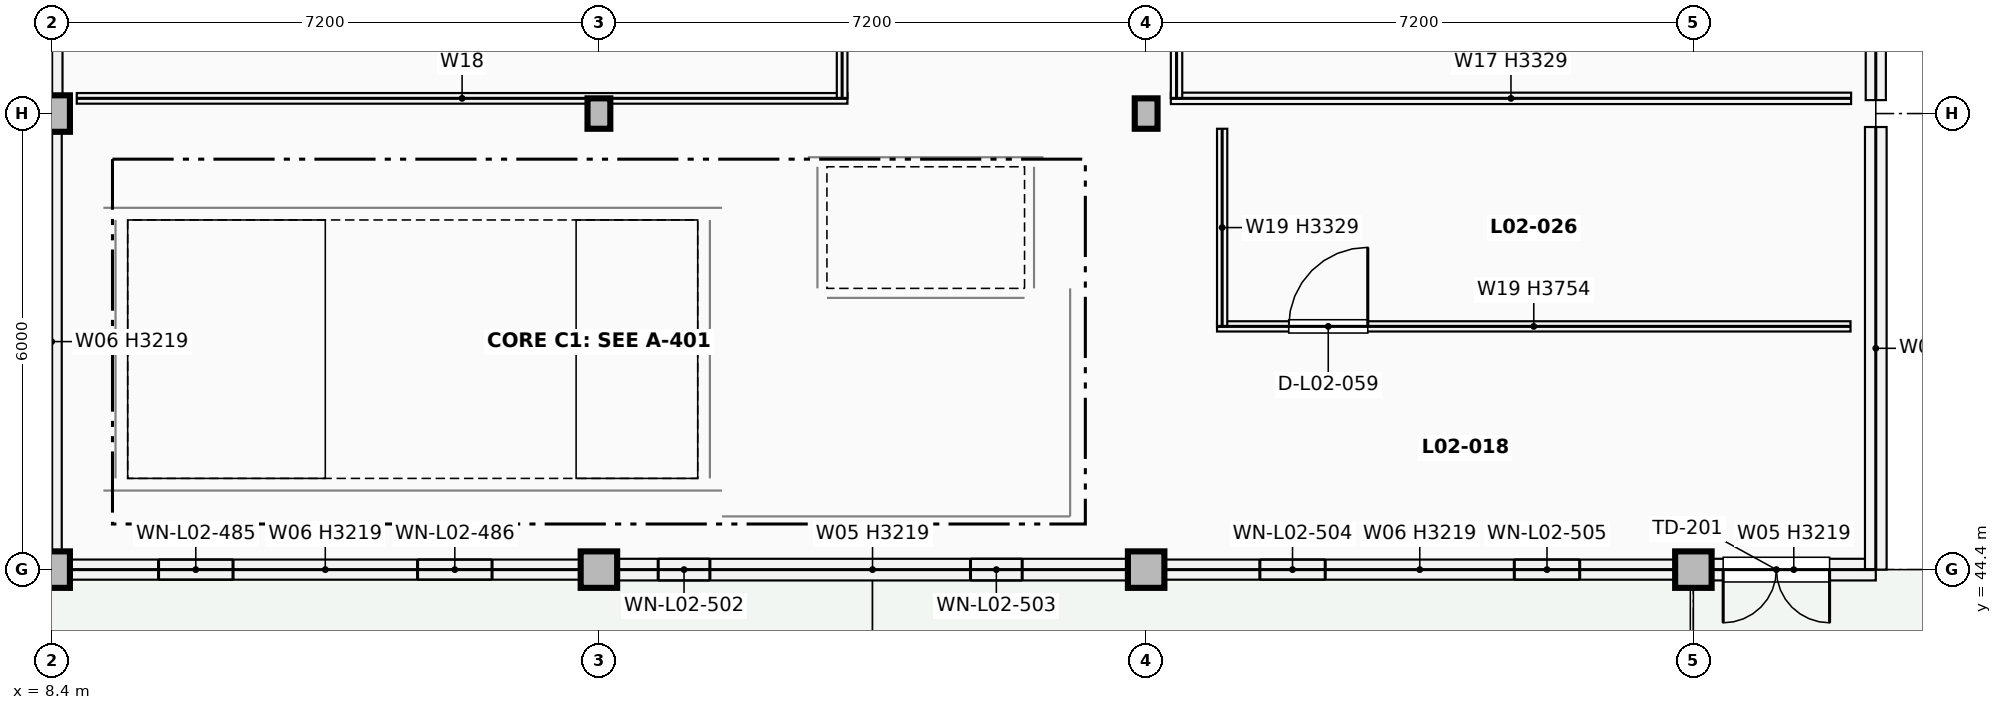
"""IFC4 building model, lengths in metres.
Left out: names, types, materials, properties, quantities, classifications, styles, units other than length and angle.
Written with IfcOpenShell. Run it as: python <this file> out.ifc"""

import sys

from ifc_helpers import new_model, si_unit, direction, frame, frame_2d, origin, origin_2d, place, context, subcontext, project, spatial, rectangle, i_section, extrude, element, fill, save


model = new_model("IFC4")
c1 = context("Model", 3, precision=1e-05, world=origin(), true_north=direction((0.0, 1.0)))
c2 = subcontext(c1, "Body", "Model", "MODEL_VIEW")
j1 = project(units=[si_unit("LENGTHUNIT", "METRE"), si_unit("PLANEANGLEUNIT", "RADIAN")], contexts=[c1])
p1 = place(None, origin())
s1 = spatial("IfcSite", under=j1, at=p1, CompositionType="ELEMENT")
p2 = place(p1, origin())
s2 = spatial("IfcBuilding", under=s1, at=p2, CompositionType="ELEMENT")
p3 = place(p2, frame((0.0, 0.0, 9.52)))
s3 = spatial("IfcBuildingStorey", under=s2, at=p3, CompositionType="ELEMENT", Elevation=9.52)
for number, where, z_axis, x_axis in (
    (1, (8.4, 44.4, 0.0), (0.0, 0.0, 1.0), (1.0, 0.0, 0.0)),
    (2, (8.4, 50.4, 0.0), (0.0, 0.0, 1.0), (1.0, 0.0, 0.0)),
    (3, (15.6, 44.4, 0.0), (0.0, 0.0, 1.0), (1.0, 0.0, 0.0)),
):
    element("IfcColumn", number, at=place(p3, frame(where, z_axis=z_axis, x_axis=x_axis)), inside=s3, PredefinedType="COLUMN", context=c2, shape_type="SweptSolid", body=[
        extrude(rectangle(XDim=0.48, YDim=0.48, at=origin_2d()), origin(), (0.0, 0.0, 1.0), 4.08),
    ])
p4 = place(p3, frame((15.6, 50.4, 0.0), z_axis=(0.0, 0.0, 1.0), x_axis=(1.0, 0.0, 0.0)))
e4 = element("IfcColumn", 4, at=p4, inside=s3, PredefinedType="COLUMN", context=c2, shape_type="SweptSolid", body=[
    extrude(i_section(OverallWidth=0.3, OverallDepth=0.4, WebThickness=0.013, FlangeThickness=0.024, at=origin_2d()), origin(), (0.0, 0.0, 1.0), 4.08),
])
p5 = place(p3, frame((22.8, 44.4, 0.0), z_axis=(0.0, 0.0, 1.0), x_axis=(1.0, 0.0, 0.0)))
e5 = element("IfcColumn", 5, at=p5, inside=s3, PredefinedType="COLUMN", context=c2, shape_type="SweptSolid", body=[
    extrude(rectangle(XDim=0.48, YDim=0.48, at=origin_2d()), origin(), (0.0, 0.0, 1.0), 4.08),
])
p6 = place(p3, frame((22.8, 50.4, 0.0), z_axis=(0.0, 0.0, 1.0), x_axis=(1.0, 0.0, 0.0)))
e6 = element("IfcColumn", 6, at=p6, inside=s3, PredefinedType="COLUMN", context=c2, shape_type="SweptSolid", body=[
    extrude(i_section(OverallWidth=0.3, OverallDepth=0.4, WebThickness=0.013, FlangeThickness=0.024, at=origin_2d()), origin(), (0.0, 0.0, 1.0), 4.08),
])
p7 = place(p3, frame((30.0, 44.4, 0.0), z_axis=(0.0, 0.0, 1.0), x_axis=(1.0, 0.0, 0.0)))
e7 = element("IfcColumn", 7, at=p7, inside=s3, PredefinedType="COLUMN", context=c2, shape_type="SweptSolid", body=[
    extrude(rectangle(XDim=0.48, YDim=0.48, at=origin_2d()), origin(), (0.0, 0.0, 1.0), 4.08),
])
p8 = place(p3, frame((8.642, 44.4, 0.0), z_axis=(0.0, 0.0, 1.0), x_axis=(1.0, 0.0, 0.0)))
e8 = element("IfcWall", 8, at=p8, inside=s3, PredefinedType="SOLIDWALL", context=c2, shape_type="SweptSolid", body=[
    extrude(rectangle(XDim=6.716, YDim=0.265, at=frame_2d((3.358, 0.0))), origin(), (0.0, 0.0, 1.0), 3.219),
])
p9 = place(p8, frame((1.164, 0.0, 0.75)))
e9 = element("IfcOpeningElement", 9, at=p9, cuts=e8, PredefinedType="OPENING", context=c2, shape_type="SweptSolid", body=[
    extrude(rectangle(XDim=0.98, YDim=1.88, at=frame_2d((0.49, 0.94))), frame((0.0, 0.143, 0.0), z_axis=(0.0, -1.0, 0.0), x_axis=(1.0, 0.0, 0.0)), (0.0, 0.0, 1.0), 0.285),
])
p10 = place(p8, frame((4.572, 0.0, 0.75)))
e10 = element("IfcOpeningElement", 10, at=p10, cuts=e8, PredefinedType="OPENING", context=c2, shape_type="SweptSolid", body=[
    extrude(rectangle(XDim=0.98, YDim=1.88, at=frame_2d((0.49, 0.94))), frame((0.0, 0.143, 0.0), z_axis=(0.0, -1.0, 0.0), x_axis=(1.0, 0.0, 0.0)), (0.0, 0.0, 1.0), 0.285),
])
p11 = place(p3, frame((15.842, 44.4, 0.0), z_axis=(0.0, 0.0, 1.0), x_axis=(1.0, 0.0, 0.0)))
e11 = element("IfcWall", 11, at=p11, inside=s3, PredefinedType="SOLIDWALL", context=c2, shape_type="SweptSolid", body=[
    extrude(rectangle(XDim=6.716, YDim=0.285, at=frame_2d((3.358, 0.0))), origin(), (0.0, 0.0, 1.0), 3.219),
])
p12 = place(p11, frame((0.538, 0.0, 0.75)))
e12 = element("IfcOpeningElement", 12, at=p12, cuts=e11, PredefinedType="OPENING", context=c2, shape_type="SweptSolid", body=[
    extrude(rectangle(XDim=0.68, YDim=2.16, at=frame_2d((0.34, 1.08))), frame((0.0, 0.152, 0.0), z_axis=(0.0, -1.0, 0.0), x_axis=(1.0, 0.0, 0.0)), (0.0, 0.0, 1.0), 0.305),
])
p13 = place(p11, frame((4.647, 0.0, 0.75)))
e13 = element("IfcOpeningElement", 13, at=p13, cuts=e11, PredefinedType="OPENING", context=c2, shape_type="SweptSolid", body=[
    extrude(rectangle(XDim=0.68, YDim=2.16, at=frame_2d((0.34, 1.08))), frame((0.0, 0.152, 0.0), z_axis=(0.0, -1.0, 0.0), x_axis=(1.0, 0.0, 0.0)), (0.0, 0.0, 1.0), 0.305),
])
p14 = place(p3, frame((23.042, 44.4, 0.0), z_axis=(0.0, 0.0, 1.0), x_axis=(1.0, 0.0, 0.0)))
e14 = element("IfcWall", 14, at=p14, inside=s3, PredefinedType="SOLIDWALL", context=c2, shape_type="SweptSolid", body=[
    extrude(rectangle(XDim=6.716, YDim=0.265, at=frame_2d((3.358, 0.0))), origin(), (0.0, 0.0, 1.0), 3.219),
])
p15 = place(p14, frame((1.254, 0.0, 0.75)))
e15 = element("IfcOpeningElement", 15, at=p15, cuts=e14, PredefinedType="OPENING", context=c2, shape_type="SweptSolid", body=[
    extrude(rectangle(XDim=0.86, YDim=2.32, at=frame_2d((0.43, 1.16))), frame((0.0, 0.143, 0.0), z_axis=(0.0, -1.0, 0.0), x_axis=(1.0, 0.0, 0.0)), (0.0, 0.0, 1.0), 0.285),
])
p16 = place(p14, frame((4.602, 0.0, 0.75)))
e16 = element("IfcOpeningElement", 16, at=p16, cuts=e14, PredefinedType="OPENING", context=c2, shape_type="SweptSolid", body=[
    extrude(rectangle(XDim=0.86, YDim=2.32, at=frame_2d((0.43, 1.16))), frame((0.0, 0.143, 0.0), z_axis=(0.0, -1.0, 0.0), x_axis=(1.0, 0.0, 0.0)), (0.0, 0.0, 1.0), 0.285),
])
p17 = place(p3, frame((30.242, 44.4, 0.0), z_axis=(0.0, 0.0, 1.0), x_axis=(1.0, 0.0, 0.0)))
e17 = element("IfcWall", 17, at=p17, inside=s3, PredefinedType="SOLIDWALL", context=c2, shape_type="SweptSolid", body=[
    extrude(rectangle(XDim=2.158, YDim=0.285, at=frame_2d((1.079, 0.0))), origin(), (0.0, 0.0, 1.0), 3.219),
])
p18 = place(p17, frame((0.15, 0.0, 0.0)))
e18 = element("IfcOpeningElement", 18, at=p18, cuts=e17, PredefinedType="OPENING", context=c2, shape_type="SweptSolid", body=[
    extrude(rectangle(XDim=1.4, YDim=2.2, at=frame_2d((0.7, 1.1))), frame((0.0, 0.152, 0.0), z_axis=(0.0, -1.0, 0.0), x_axis=(1.0, 0.0, 0.0)), (0.0, 0.0, 1.0), 0.305),
])
p19 = place(p3, frame((8.4, 44.642, 0.0), z_axis=(0.0, 0.0, 1.0), x_axis=(0.0, 1.0, 0.0)))
e19 = element("IfcWall", 19, at=p19, inside=s3, PredefinedType="SOLIDWALL", context=c2, shape_type="SweptSolid", body=[
    extrude(rectangle(XDim=5.516, YDim=0.265, at=frame_2d((2.758, 0.0))), origin(), (0.0, 0.0, 1.0), 3.219),
])
p20 = place(p3, frame((8.4, 50.642, 0.0), z_axis=(0.0, 0.0, 1.0), x_axis=(0.0, 1.0, 0.0)))
e20 = element("IfcWall", 20, at=p20, inside=s3, PredefinedType="SOLIDWALL", context=c2, shape_type="SweptSolid", body=[
    extrude(rectangle(XDim=6.781, YDim=0.285, at=frame_2d((3.391, 0.0))), origin(), (0.0, 0.0, 1.0), 3.329),
])
p21 = place(p3, frame((32.4, 44.4, 0.0), z_axis=(0.0, 0.0, 1.0), x_axis=(0.0, 1.0, 0.0)))
e21 = element("IfcWall", 21, at=p21, inside=s3, PredefinedType="SOLIDWALL", context=c2, shape_type="SweptSolid", body=[
    extrude(rectangle(XDim=5.823, YDim=0.285, at=frame_2d((2.912, 0.0))), origin(), (0.0, 0.0, 1.0), 3.329),
])
p22 = place(p3, frame((32.4, 50.577, 0.0), z_axis=(0.0, 0.0, 1.0), x_axis=(0.0, 1.0, 0.0)))
e22 = element("IfcWall", 22, at=p22, inside=s3, PredefinedType="SOLIDWALL", context=c2, shape_type="SweptSolid", body=[
    extrude(rectangle(XDim=6.846, YDim=0.265, at=frame_2d((3.423, 0.0))), origin(), (0.0, 0.0, 1.0), 3.329),
])
p23 = place(p3, frame((9.24, 45.6, 0.0), z_axis=(0.0, 0.0, 1.0), x_axis=(0.0, 1.0, 0.0)))
e23 = element("IfcWall", 23, at=p23, inside=s3, PredefinedType="SHEAR", context=c2, shape_type="SweptSolid", body=[
    extrude(rectangle(XDim=3.4, YDim=0.32, at=frame_2d((1.7, 0.0))), origin(), (0.0, 0.0, 1.0), 4.08),
])
for number, where, z_axis, x_axis in (
    (24, (9.08, 45.44, 0.0), (0.0, 0.0, 1.0), (1.0, 0.0, 0.0)),
    (25, (9.08, 49.16, 0.0), (0.0, 0.0, 1.0), (1.0, 0.0, 0.0)),
):
    element("IfcWall", number, at=place(p3, frame(where, z_axis=z_axis, x_axis=x_axis)), inside=s3, PredefinedType="SHEAR", context=c2, shape_type="SweptSolid", body=[
        extrude(rectangle(XDim=8.14, YDim=0.32, at=frame_2d((4.07, 0.0))), origin(), (0.0, 0.0, 1.0), 4.08),
    ])
p24 = place(p3, frame((17.06, 45.6, 0.0), z_axis=(0.0, 0.0, 1.0), x_axis=(0.0, 1.0, 0.0)))
e26 = element("IfcWall", 26, at=p24, inside=s3, PredefinedType="SHEAR", context=c2, shape_type="SweptSolid", body=[
    extrude(rectangle(XDim=3.4, YDim=0.32, at=frame_2d((1.7, 0.0))), origin(), (0.0, 0.0, 1.0), 4.08),
])
p25 = place(p24, frame((0.65, 0.0, 0.0)))
e27 = element("IfcOpeningElement", 27, at=p25, cuts=e26, PredefinedType="OPENING", context=c2, shape_type="SweptSolid", body=[
    extrude(rectangle(XDim=1.2, YDim=2.2, at=frame_2d((0.6, 1.1))), frame((0.0, 0.17, 0.0), z_axis=(0.0, -1.0, 0.0), x_axis=(1.0, 0.0, 0.0)), (0.0, 0.0, 1.0), 0.34),
])
for number, where, z_axis, x_axis in (
    (28, (18.475, 48.1, 0.0), (0.0, 0.0, 1.0), (0.0, 1.0, 0.0)),
    (29, (21.325, 48.1, 0.0), (0.0, 0.0, 1.0), (0.0, 1.0, 0.0)),
):
    element("IfcWall", number, at=place(p3, frame(where, z_axis=z_axis, x_axis=x_axis)), inside=s3, PredefinedType="SHEAR", context=c2, shape_type="SweptSolid", body=[
        extrude(rectangle(XDim=1.6, YDim=0.25, at=frame_2d((0.8, 0.0))), origin(), (0.0, 0.0, 1.0), 4.08),
    ])
p26 = place(p3, frame((18.35, 49.825, 0.0), z_axis=(0.0, 0.0, 1.0), x_axis=(1.0, 0.0, 0.0)))
e30 = element("IfcWall", 30, at=p26, inside=s3, PredefinedType="SHEAR", context=c2, shape_type="SweptSolid", body=[
    extrude(rectangle(XDim=3.1, YDim=0.25, at=frame_2d((1.55, 0.0))), origin(), (0.0, 0.0, 1.0), 4.08),
])
p27 = place(p3, frame((18.6, 47.975, 0.0), z_axis=(0.0, 0.0, 1.0), x_axis=(1.0, 0.0, 0.0)))
e31 = element("IfcWall", 31, at=p27, inside=s3, PredefinedType="SHEAR", context=c2, shape_type="SweptSolid", body=[
    extrude(rectangle(XDim=2.6, YDim=0.25, at=frame_2d((1.3, 0.0))), origin(), (0.0, 0.0, 1.0), 4.08),
])
p28 = place(p27, frame((0.75, 0.0, 0.0)))
e32 = element("IfcOpeningElement", 32, at=p28, cuts=e31, PredefinedType="OPENING", context=c2, shape_type="SweptSolid", body=[
    extrude(rectangle(XDim=1.1, YDim=2.15, at=frame_2d((0.55, 1.075))), frame((0.0, 0.135, 0.0), z_axis=(0.0, -1.0, 0.0), x_axis=(1.0, 0.0, 0.0)), (0.0, 0.0, 1.0), 0.27),
])
p29 = place(p3, frame((21.8, 45.1, 0.0), z_axis=(0.0, 0.0, 1.0), x_axis=(0.0, 1.0, 0.0)))
e33 = element("IfcWall", 33, at=p29, inside=s3, PredefinedType="PARTITIONING", context=c2, shape_type="SweptSolid", body=[
    extrude(rectangle(XDim=3.0, YDim=0.2, at=frame_2d((1.5, 0.0))), origin(), (0.0, 0.0, 1.0), 3.754),
])
p30 = place(p29, frame((0.775, 0.0, 0.0)))
e34 = element("IfcOpeningElement", 34, at=p30, cuts=e33, PredefinedType="OPENING", context=c2, shape_type="SweptSolid", body=[
    extrude(rectangle(XDim=1.45, YDim=2.2, at=frame_2d((0.725, 1.1))), frame((0.0, 0.11, 0.0), z_axis=(0.0, -1.0, 0.0), x_axis=(1.0, 0.0, 0.0)), (0.0, 0.0, 1.0), 0.22),
])
p31 = place(p3, frame((17.22, 45.1, 0.0), z_axis=(0.0, 0.0, 1.0), x_axis=(1.0, 0.0, 0.0)))
e35 = element("IfcWall", 35, at=p31, inside=s3, PredefinedType="PARTITIONING", context=c2, shape_type="SweptSolid", body=[
    extrude(rectangle(XDim=4.58, YDim=0.2, at=frame_2d((2.29, 0.0))), origin(), (0.0, 0.0, 1.0), 3.754),
])
p32 = place(p3, frame((8.73, 50.6, 0.0), z_axis=(0.0, 0.0, 1.0), x_axis=(1.0, 0.0, 0.0)))
e36 = element("IfcWall", 36, at=p32, inside=s3, PredefinedType="PARTITIONING", context=c2, shape_type="SweptSolid", body=[
    extrude(rectangle(XDim=10.14, YDim=0.14, at=frame_2d((5.07, 0.0))), origin(), (0.0, 0.0, 1.0), 3.299),
])
p33 = place(p3, frame((18.8, 50.6, 0.0), z_axis=(0.0, 0.0, 1.0), x_axis=(0.0, 1.0, 0.0)))
e37 = element("IfcWall", 37, at=p33, inside=s3, PredefinedType="PARTITIONING", context=c2, shape_type="SweptSolid", body=[
    extrude(rectangle(XDim=9.2, YDim=0.14, at=frame_2d((4.6, 0.0))), origin(), (0.0, 0.0, 1.0), 3.329),
])
p34 = place(p33, frame((2.165, 0.0, 0.0)))
e38 = element("IfcOpeningElement", 38, at=p34, cuts=e37, PredefinedType="OPENING", context=c2, shape_type="SweptSolid", body=[
    extrude(rectangle(XDim=0.94, YDim=2.1, at=frame_2d((0.47, 1.05))), frame((0.0, 0.08, 0.0), z_axis=(0.0, -1.0, 0.0), x_axis=(1.0, 0.0, 0.0)), (0.0, 0.0, 1.0), 0.16),
])
p35 = place(p3, frame((23.125, 50.6, 0.0), z_axis=(0.0, 0.0, 1.0), x_axis=(1.0, 0.0, 0.0)))
e39 = element("IfcWall", 39, at=p35, inside=s3, PredefinedType="PARTITIONING", context=c2, shape_type="SweptSolid", body=[
    extrude(rectangle(XDim=8.95, YDim=0.15, at=frame_2d((4.475, 0.0))), origin(), (0.0, 0.0, 1.0), 3.329),
])
p36 = place(p3, frame((23.2, 50.6, 0.0), z_axis=(0.0, 0.0, 1.0), x_axis=(0.0, 1.0, 0.0)))
e40 = element("IfcWall", 40, at=p36, inside=s3, PredefinedType="PARTITIONING", context=c2, shape_type="SweptSolid", body=[
    extrude(rectangle(XDim=9.2, YDim=0.15, at=frame_2d((4.6, 0.0))), origin(), (0.0, 0.0, 1.0), 3.329),
])
p37 = place(p36, frame((2.045, 0.0, 0.0)))
e41 = element("IfcOpeningElement", 41, at=p37, cuts=e40, PredefinedType="OPENING", context=c2, shape_type="SweptSolid", body=[
    extrude(rectangle(XDim=1.42, YDim=2.26, at=frame_2d((0.71, 1.13))), frame((0.0, 0.085, 0.0), z_axis=(0.0, -1.0, 0.0), x_axis=(1.0, 0.0, 0.0)), (0.0, 0.0, 1.0), 0.17),
])
p38 = place(p3, frame((23.732, 47.6, 0.0), z_axis=(0.0, 0.0, 1.0), x_axis=(1.0, 0.0, 0.0)))
e42 = element("IfcWall", 42, at=p38, inside=s3, PredefinedType="PARTITIONING", context=c2, shape_type="SweptSolid", body=[
    extrude(rectangle(XDim=8.335, YDim=0.135, at=frame_2d((4.167, 0.0))), origin(), (0.0, 0.0, 1.0), 3.754),
])
p39 = place(p38, frame((0.944, 0.0, 0.0)))
e43 = element("IfcOpeningElement", 43, at=p39, cuts=e42, PredefinedType="OPENING", context=c2, shape_type="SweptSolid", body=[
    extrude(rectangle(XDim=1.04, YDim=2.12, at=frame_2d((0.52, 1.06))), frame((0.0, 0.078, 0.0), z_axis=(0.0, -1.0, 0.0), x_axis=(1.0, 0.0, 0.0)), (0.0, 0.0, 1.0), 0.155),
])
p40 = place(p3, frame((23.8, 47.6, 0.0), z_axis=(0.0, 0.0, 1.0), x_axis=(0.0, 1.0, 0.0)))
e44 = element("IfcWall", 44, at=p40, inside=s3, PredefinedType="PARTITIONING", context=c2, shape_type="SweptSolid", body=[
    extrude(rectangle(XDim=2.6, YDim=0.135, at=frame_2d((1.3, 0.0))), origin(), (0.0, 0.0, 1.0), 3.329),
])
p41 = place(p9, origin())
e45 = element("IfcWindow", 45, at=p41, inside=s3, PartitioningType="SINGLE_PANEL", PredefinedType="WINDOW", context=c2, shape_type="SweptSolid", body=[
    extrude(rectangle(XDim=0.98, YDim=1.88, at=frame_2d((0.49, 0.94))), frame((0.0, 0.03, 0.0), z_axis=(0.0, -1.0, 0.0), x_axis=(1.0, 0.0, 0.0)), (0.0, 0.0, 1.0), 0.06),
])
fill(e9, e45)
p42 = place(p10, origin())
e46 = element("IfcWindow", 46, at=p42, inside=s3, PartitioningType="SINGLE_PANEL", PredefinedType="WINDOW", context=c2, shape_type="SweptSolid", body=[
    extrude(rectangle(XDim=0.98, YDim=1.88, at=frame_2d((0.49, 0.94))), frame((0.0, 0.03, 0.0), z_axis=(0.0, -1.0, 0.0), x_axis=(1.0, 0.0, 0.0)), (0.0, 0.0, 1.0), 0.06),
])
fill(e10, e46)
p43 = place(p12, origin())
e47 = element("IfcWindow", 47, at=p43, inside=s3, PartitioningType="SINGLE_PANEL", PredefinedType="WINDOW", context=c2, shape_type="SweptSolid", body=[
    extrude(rectangle(XDim=0.68, YDim=2.16, at=frame_2d((0.34, 1.08))), frame((0.0, 0.03, 0.0), z_axis=(0.0, -1.0, 0.0), x_axis=(1.0, 0.0, 0.0)), (0.0, 0.0, 1.0), 0.06),
])
fill(e12, e47)
p44 = place(p13, origin())
e48 = element("IfcWindow", 48, at=p44, inside=s3, PartitioningType="SINGLE_PANEL", PredefinedType="WINDOW", context=c2, shape_type="SweptSolid", body=[
    extrude(rectangle(XDim=0.68, YDim=2.16, at=frame_2d((0.34, 1.08))), frame((0.0, 0.03, 0.0), z_axis=(0.0, -1.0, 0.0), x_axis=(1.0, 0.0, 0.0)), (0.0, 0.0, 1.0), 0.06),
])
fill(e13, e48)
p45 = place(p15, origin())
e49 = element("IfcWindow", 49, at=p45, inside=s3, PartitioningType="SINGLE_PANEL", PredefinedType="WINDOW", context=c2, shape_type="SweptSolid", body=[
    extrude(rectangle(XDim=0.86, YDim=2.32, at=frame_2d((0.43, 1.16))), frame((0.0, 0.03, 0.0), z_axis=(0.0, -1.0, 0.0), x_axis=(1.0, 0.0, 0.0)), (0.0, 0.0, 1.0), 0.06),
])
fill(e15, e49)
p46 = place(p16, origin())
e50 = element("IfcWindow", 50, at=p46, inside=s3, PartitioningType="SINGLE_PANEL", PredefinedType="WINDOW", context=c2, shape_type="SweptSolid", body=[
    extrude(rectangle(XDim=0.86, YDim=2.32, at=frame_2d((0.43, 1.16))), frame((0.0, 0.03, 0.0), z_axis=(0.0, -1.0, 0.0), x_axis=(1.0, 0.0, 0.0)), (0.0, 0.0, 1.0), 0.06),
])
fill(e16, e50)
p47 = place(p18, frame((1.4, 0.0, 0.0), z_axis=(0.0, 0.0, 1.0), x_axis=(-1.0, 0.0, 0.0)))
e51 = element("IfcDoor", 51, at=p47, inside=s3, OperationType="DOUBLE_DOOR_SINGLE_SWING", PredefinedType="DOOR", context=c2, shape_type="SweptSolid", body=[
    extrude(rectangle(XDim=1.4, YDim=2.2, at=frame_2d((0.7, 1.1))), frame((0.0, 0.025, 0.0), z_axis=(0.0, -1.0, 0.0), x_axis=(1.0, 0.0, 0.0)), (0.0, 0.0, 1.0), 0.05),
])
fill(e18, e51)
p48 = place(p25, origin())
e52 = element("IfcDoor", 52, at=p48, inside=s3, OperationType="SINGLE_SWING_LEFT", PredefinedType="DOOR", context=c2, shape_type="SweptSolid", body=[
    extrude(rectangle(XDim=1.2, YDim=2.2, at=frame_2d((0.6, 1.1))), frame((0.0, 0.025, 0.0), z_axis=(0.0, -1.0, 0.0), x_axis=(1.0, 0.0, 0.0)), (0.0, 0.0, 1.0), 0.05),
])
fill(e27, e52)
p49 = place(p28, origin())
e53 = element("IfcDoor", 53, at=p49, inside=s3, OperationType="DOUBLE_DOOR_SLIDING", PredefinedType="DOOR", context=c2, shape_type="SweptSolid", body=[
    extrude(rectangle(XDim=1.1, YDim=2.15, at=frame_2d((0.55, 1.075))), frame((0.0, 0.025, 0.0), z_axis=(0.0, -1.0, 0.0), x_axis=(1.0, 0.0, 0.0)), (0.0, 0.0, 1.0), 0.05),
])
fill(e32, e53)
p50 = place(p30, frame((1.45, 0.0, 0.0), z_axis=(0.0, 0.0, 1.0), x_axis=(-1.0, 0.0, 0.0)))
e54 = element("IfcDoor", 54, at=p50, inside=s3, OperationType="DOUBLE_DOOR_SINGLE_SWING", PredefinedType="DOOR", context=c2, shape_type="SweptSolid", body=[
    extrude(rectangle(XDim=1.45, YDim=2.2, at=frame_2d((0.725, 1.1))), frame((0.0, 0.025, 0.0), z_axis=(0.0, -1.0, 0.0), x_axis=(1.0, 0.0, 0.0)), (0.0, 0.0, 1.0), 0.05),
])
fill(e34, e54)
p51 = place(p39, origin())
e55 = element("IfcDoor", 55, at=p51, inside=s3, OperationType="SINGLE_SWING_RIGHT", PredefinedType="DOOR", context=c2, shape_type="SweptSolid", body=[
    extrude(rectangle(XDim=1.04, YDim=2.12, at=frame_2d((0.52, 1.06))), frame((0.0, 0.025, 0.0), z_axis=(0.0, -1.0, 0.0), x_axis=(1.0, 0.0, 0.0)), (0.0, 0.0, 1.0), 0.05),
])
fill(e43, e55)
save(model, sys.argv[1])
